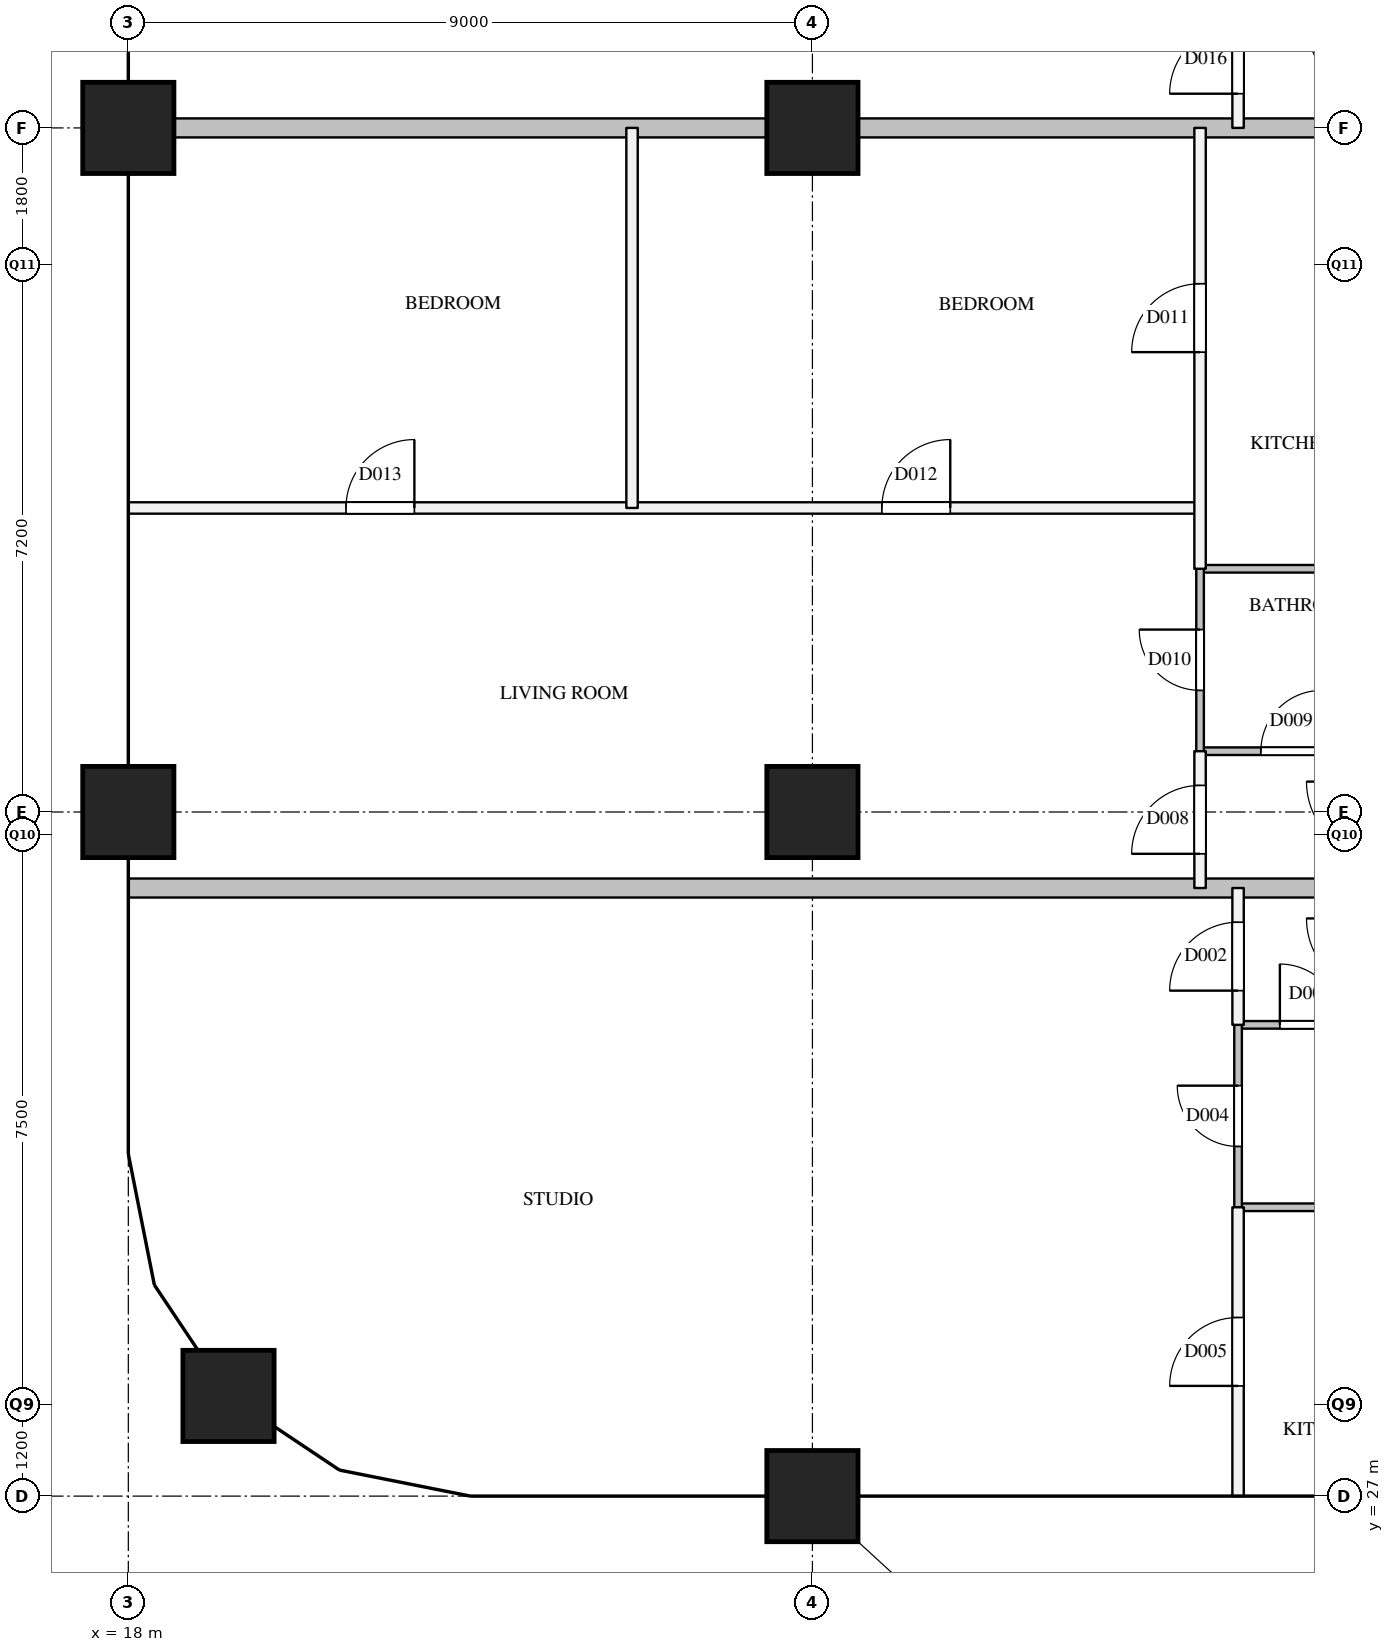
"""IFC4 building model, lengths in metres.
Left out: names, types, materials, properties, quantities, classifications, styles, units other than length and angle.
Written with IfcOpenShell. Run it as: python <this file> out.ifc"""

import sys

from ifc_helpers import new_model, si_unit, direction, frame, frame_2d, origin, origin_2d, place, context, subcontext, project, spatial, rectangle, extrude, element, fill, save


model = new_model("IFC4")
c1 = context("Model", 3, precision=1e-05, world=origin(), true_north=direction((0.0, 1.0)))
c2 = subcontext(c1, "Body", "Model", "MODEL_VIEW")
j1 = project(units=[si_unit("LENGTHUNIT", "METRE"), si_unit("PLANEANGLEUNIT", "RADIAN")], contexts=[c1])
p1 = place(None, origin())
s1 = spatial("IfcSite", under=j1, at=p1, CompositionType="ELEMENT")
p2 = place(p1, origin())
s2 = spatial("IfcBuilding", under=s1, at=p2, CompositionType="ELEMENT")
p3 = place(p2, frame((0.0, 0.0, 238.4)))
s3 = spatial("IfcBuildingStorey", under=s2, at=p3, CompositionType="ELEMENT", Elevation=238.4)
for number, where, z_axis, x_axis in (
    (1, (19.318, 28.318, 0.0), (0.0, 0.0, 1.0), (1.0, 0.0, 0.0)),
    (2, (18.0, 36.0, 0.0), (0.0, 0.0, 1.0), (1.0, 0.0, 0.0)),
    (3, (18.0, 45.0, 0.0), (0.0, 0.0, 1.0), (1.0, 0.0, 0.0)),
    (4, (27.0, 27.0, 0.0), (0.0, 0.0, 1.0), (1.0, 0.0, 0.0)),
    (5, (27.0, 36.0, 0.0), (0.0, 0.0, 1.0), (1.0, 0.0, 0.0)),
    (6, (27.0, 45.0, 0.0), (0.0, 0.0, 1.0), (1.0, 0.0, 0.0)),
):
    element("IfcColumn", number, at=place(p3, frame(where, z_axis=z_axis, x_axis=x_axis)), inside=s3, PredefinedType="COLUMN", context=c2, shape_type="SweptSolid", body=[
        extrude(rectangle(XDim=1.2, YDim=1.2, at=origin_2d()), origin(), (0.0, 0.0, 1.0), 3.9),
    ])
p4 = place(p3, frame((18.0, 40.0, 0.0), z_axis=(0.0, 0.0, 1.0), x_axis=(1.0, 0.0, 0.0)))
e7 = element("IfcWall", 7, at=p4, inside=s3, PredefinedType="PARTITIONING", context=c2, shape_type="SweptSolid", body=[
    extrude(rectangle(XDim=14.1, YDim=0.15, at=frame_2d((7.05, 0.0))), origin(), (0.0, 0.0, 1.0), 2.6),
])
p5 = place(p4, frame((9.914, 0.0, 0.0)))
e8 = element("IfcOpeningElement", 8, at=p5, cuts=e7, PredefinedType="OPENING", context=c2, shape_type="SweptSolid", body=[
    extrude(rectangle(XDim=0.9, YDim=2.1, at=frame_2d((0.45, 1.05))), frame((0.0, 0.085, 0.0), z_axis=(0.0, -1.0, 0.0), x_axis=(1.0, 0.0, 0.0)), (0.0, 0.0, 1.0), 0.17),
])
p6 = place(p4, frame((2.864, 0.0, 0.0)))
e9 = element("IfcOpeningElement", 9, at=p6, cuts=e7, PredefinedType="OPENING", context=c2, shape_type="SweptSolid", body=[
    extrude(rectangle(XDim=0.9, YDim=2.1, at=frame_2d((0.45, 1.05))), frame((0.0, 0.085, 0.0), z_axis=(0.0, -1.0, 0.0), x_axis=(1.0, 0.0, 0.0)), (0.0, 0.0, 1.0), 0.17),
])
p7 = place(p3, frame((24.627, 40.0, 0.0), z_axis=(0.0, 0.0, 1.0), x_axis=(0.0, 1.0, 0.0)))
e10 = element("IfcWall", 10, at=p7, inside=s3, PredefinedType="PARTITIONING", context=c2, shape_type="SweptSolid", body=[
    extrude(rectangle(XDim=5.0, YDim=0.15, at=frame_2d((2.5, 0.0))), origin(), (0.0, 0.0, 1.0), 3.6),
])
p8 = place(p3, frame((32.1, 35.0, 0.0), z_axis=(0.0, 0.0, 1.0), x_axis=(0.0, 1.0, 0.0)))
e11 = element("IfcWall", 11, at=p8, inside=s3, PredefinedType="PARTITIONING", context=c2, shape_type="SweptSolid", body=[
    extrude(rectangle(XDim=1.8, YDim=0.15, at=frame_2d((0.9, 0.0))), origin(), (0.0, 0.0, 1.0), 3.6),
])
p9 = place(p8, frame((0.45, 0.0, 0.0)))
e12 = element("IfcOpeningElement", 12, at=p9, cuts=e11, PredefinedType="OPENING", context=c2, shape_type="SweptSolid", body=[
    extrude(rectangle(XDim=0.9, YDim=2.1, at=frame_2d((0.45, 1.05))), frame((0.0, 0.085, 0.0), z_axis=(0.0, -1.0, 0.0), x_axis=(1.0, 0.0, 0.0)), (0.0, 0.0, 1.0), 0.17),
])
p10 = place(p3, frame((32.1, 39.2, 0.0), z_axis=(0.0, 0.0, 1.0), x_axis=(0.0, 1.0, 0.0)))
e13 = element("IfcWall", 13, at=p10, inside=s3, PredefinedType="PARTITIONING", context=c2, shape_type="SweptSolid", body=[
    extrude(rectangle(XDim=5.8, YDim=0.15, at=frame_2d((2.9, 0.0))), origin(), (0.0, 0.0, 1.0), 3.6),
])
p11 = place(p10, frame((2.85, 0.0, 0.0)))
e14 = element("IfcOpeningElement", 14, at=p11, cuts=e13, PredefinedType="OPENING", context=c2, shape_type="SweptSolid", body=[
    extrude(rectangle(XDim=0.9, YDim=2.1, at=frame_2d((0.45, 1.05))), frame((0.0, 0.085, 0.0), z_axis=(0.0, -1.0, 0.0), x_axis=(1.0, 0.0, 0.0)), (0.0, 0.0, 1.0), 0.17),
])
p12 = place(p3, frame((32.6, 27.0, 0.0), z_axis=(0.0, 0.0, 1.0), x_axis=(0.0, 1.0, 0.0)))
e15 = element("IfcWall", 15, at=p12, inside=s3, PredefinedType="PARTITIONING", context=c2, shape_type="SweptSolid", body=[
    extrude(rectangle(XDim=3.8, YDim=0.15, at=frame_2d((1.9, 0.0))), origin(), (0.0, 0.0, 1.0), 2.6),
])
p13 = place(p12, frame((1.45, 0.0, 0.0)))
e16 = element("IfcOpeningElement", 16, at=p13, cuts=e15, PredefinedType="OPENING", context=c2, shape_type="SweptSolid", body=[
    extrude(rectangle(XDim=0.9, YDim=2.1, at=frame_2d((0.45, 1.05))), frame((0.0, 0.085, 0.0), z_axis=(0.0, -1.0, 0.0), x_axis=(1.0, 0.0, 0.0)), (0.0, 0.0, 1.0), 0.17),
])
p14 = place(p3, frame((32.6, 33.2, 0.0), z_axis=(0.0, 0.0, 1.0), x_axis=(0.0, 1.0, 0.0)))
e17 = element("IfcWall", 17, at=p14, inside=s3, PredefinedType="PARTITIONING", context=c2, shape_type="SweptSolid", body=[
    extrude(rectangle(XDim=1.8, YDim=0.15, at=frame_2d((0.9, 0.0))), origin(), (0.0, 0.0, 1.0), 3.6),
])
p15 = place(p14, frame((0.45, 0.0, 0.0)))
e18 = element("IfcOpeningElement", 18, at=p15, cuts=e17, PredefinedType="OPENING", context=c2, shape_type="SweptSolid", body=[
    extrude(rectangle(XDim=0.9, YDim=2.1, at=frame_2d((0.45, 1.05))), frame((0.0, 0.085, 0.0), z_axis=(0.0, -1.0, 0.0), x_axis=(1.0, 0.0, 0.0)), (0.0, 0.0, 1.0), 0.17),
])
p16 = place(p3, frame((32.6, 45.0, 0.0), z_axis=(0.0, 0.0, 1.0), x_axis=(0.0, 1.0, 0.0)))
e19 = element("IfcWall", 19, at=p16, inside=s3, PredefinedType="PARTITIONING", context=c2, shape_type="SweptSolid", body=[
    extrude(rectangle(XDim=1.8, YDim=0.15, at=frame_2d((0.9, 0.0))), origin(), (0.0, 0.0, 1.0), 3.6),
])
p17 = place(p16, frame((0.45, 0.0, 0.0)))
e20 = element("IfcOpeningElement", 20, at=p17, cuts=e19, PredefinedType="OPENING", context=c2, shape_type="SweptSolid", body=[
    extrude(rectangle(XDim=0.9, YDim=2.1, at=frame_2d((0.45, 1.05))), frame((0.0, 0.085, 0.0), z_axis=(0.0, -1.0, 0.0), x_axis=(1.0, 0.0, 0.0)), (0.0, 0.0, 1.0), 0.17),
])
p18 = place(p3, frame((18.0, 35.0, 0.0), z_axis=(0.0, 0.0, 1.0), x_axis=(1.0, 0.0, 0.0)))
e21 = element("IfcWall", 21, at=p18, inside=s3, PredefinedType="PARTITIONING", context=c2, shape_type="SweptSolid", body=[
    extrude(rectangle(XDim=16.5, YDim=0.25, at=frame_2d((8.25, 0.0))), origin(), (0.0, 0.0, 1.0), 2.6),
])
p19 = place(p3, frame((18.0, 45.0, 0.0), z_axis=(0.0, 0.0, 1.0), x_axis=(1.0, 0.0, 0.0)))
e22 = element("IfcWall", 22, at=p19, inside=s3, PredefinedType="PARTITIONING", context=c2, shape_type="SweptSolid", body=[
    extrude(rectangle(XDim=16.5, YDim=0.25, at=frame_2d((8.25, 0.0))), origin(), (0.0, 0.0, 1.0), 3.6),
])
p20 = place(p3, frame((32.6, 30.8, 0.0), z_axis=(0.0, 0.0, 1.0), x_axis=(1.0, 0.0, 0.0)))
e23 = element("IfcWall", 23, at=p20, inside=s3, PredefinedType="PARTITIONING", context=c2, shape_type="SweptSolid", body=[
    extrude(rectangle(XDim=1.9, YDim=0.1, at=frame_2d((0.95, 0.0))), origin(), (0.0, 0.0, 1.0), 3.6),
])
p21 = place(p3, frame((32.6, 33.2, 0.0), z_axis=(0.0, 0.0, 1.0), x_axis=(1.0, 0.0, 0.0)))
e24 = element("IfcWall", 24, at=p21, inside=s3, PredefinedType="PARTITIONING", context=c2, shape_type="SweptSolid", body=[
    extrude(rectangle(XDim=1.9, YDim=0.1, at=frame_2d((0.95, 0.0))), origin(), (0.0, 0.0, 1.0), 3.6),
])
p22 = place(p21, frame((0.55, 0.0, 0.0)))
e25 = element("IfcOpeningElement", 25, at=p22, cuts=e24, PredefinedType="OPENING", context=c2, shape_type="SweptSolid", body=[
    extrude(rectangle(XDim=0.8, YDim=2.1, at=frame_2d((0.4, 1.05))), frame((0.0, 0.06, 0.0), z_axis=(0.0, -1.0, 0.0), x_axis=(1.0, 0.0, 0.0)), (0.0, 0.0, 1.0), 0.12),
])
p23 = place(p3, frame((32.1, 36.8, 0.0), z_axis=(0.0, 0.0, 1.0), x_axis=(1.0, 0.0, 0.0)))
e26 = element("IfcWall", 26, at=p23, inside=s3, PredefinedType="PARTITIONING", context=c2, shape_type="SweptSolid", body=[
    extrude(rectangle(XDim=2.4, YDim=0.1, at=frame_2d((1.2, 0.0))), origin(), (0.0, 0.0, 1.0), 3.6),
])
p24 = place(p23, frame((0.8, 0.0, 0.0)))
e27 = element("IfcOpeningElement", 27, at=p24, cuts=e26, PredefinedType="OPENING", context=c2, shape_type="SweptSolid", body=[
    extrude(rectangle(XDim=0.8, YDim=2.1, at=frame_2d((0.4, 1.05))), frame((0.0, 0.06, 0.0), z_axis=(0.0, -1.0, 0.0), x_axis=(1.0, 0.0, 0.0)), (0.0, 0.0, 1.0), 0.12),
])
p25 = place(p3, frame((32.1, 39.2, 0.0), z_axis=(0.0, 0.0, 1.0), x_axis=(1.0, 0.0, 0.0)))
e28 = element("IfcWall", 28, at=p25, inside=s3, PredefinedType="PARTITIONING", context=c2, shape_type="SweptSolid", body=[
    extrude(rectangle(XDim=2.4, YDim=0.1, at=frame_2d((1.2, 0.0))), origin(), (0.0, 0.0, 1.0), 3.6),
])
p26 = place(p3, frame((32.1, 36.8, 0.0), z_axis=(0.0, 0.0, 1.0), x_axis=(0.0, 1.0, 0.0)))
e29 = element("IfcWall", 29, at=p26, inside=s3, PredefinedType="PARTITIONING", context=c2, shape_type="SweptSolid", body=[
    extrude(rectangle(XDim=2.4, YDim=0.1, at=frame_2d((1.2, 0.0))), origin(), (0.0, 0.0, 1.0), 3.6),
])
p27 = place(p26, frame((0.8, 0.0, 0.0)))
e30 = element("IfcOpeningElement", 30, at=p27, cuts=e29, PredefinedType="OPENING", context=c2, shape_type="SweptSolid", body=[
    extrude(rectangle(XDim=0.8, YDim=2.1, at=frame_2d((0.4, 1.05))), frame((0.0, 0.06, 0.0), z_axis=(0.0, -1.0, 0.0), x_axis=(1.0, 0.0, 0.0)), (0.0, 0.0, 1.0), 0.12),
])
p28 = place(p3, frame((32.6, 30.8, 0.0), z_axis=(0.0, 0.0, 1.0), x_axis=(0.0, 1.0, 0.0)))
e31 = element("IfcWall", 31, at=p28, inside=s3, PredefinedType="PARTITIONING", context=c2, shape_type="SweptSolid", body=[
    extrude(rectangle(XDim=2.4, YDim=0.1, at=frame_2d((1.2, 0.0))), origin(), (0.0, 0.0, 1.0), 3.6),
])
p29 = place(p28, frame((0.8, 0.0, 0.0)))
e32 = element("IfcOpeningElement", 32, at=p29, cuts=e31, PredefinedType="OPENING", context=c2, shape_type="SweptSolid", body=[
    extrude(rectangle(XDim=0.8, YDim=2.1, at=frame_2d((0.4, 1.05))), frame((0.0, 0.06, 0.0), z_axis=(0.0, -1.0, 0.0), x_axis=(1.0, 0.0, 0.0)), (0.0, 0.0, 1.0), 0.12),
])
p30 = place(p15, origin())
e33 = element("IfcDoor", 33, at=p30, inside=s3, OperationType="SINGLE_SWING_LEFT", PredefinedType="DOOR", context=c2, shape_type="SweptSolid", body=[
    extrude(rectangle(XDim=0.9, YDim=2.1, at=frame_2d((0.45, 1.05))), frame((0.0, 0.025, 0.0), z_axis=(0.0, -1.0, 0.0), x_axis=(1.0, 0.0, 0.0)), (0.0, 0.0, 1.0), 0.05),
])
fill(e18, e33)
p31 = place(p22, origin())
e34 = element("IfcDoor", 34, at=p31, inside=s3, OperationType="SINGLE_SWING_LEFT", PredefinedType="DOOR", context=c2, shape_type="SweptSolid", body=[
    extrude(rectangle(XDim=0.8, YDim=2.1, at=frame_2d((0.4, 1.05))), frame((0.0, 0.025, 0.0), z_axis=(0.0, -1.0, 0.0), x_axis=(1.0, 0.0, 0.0)), (0.0, 0.0, 1.0), 0.05),
])
fill(e25, e34)
p32 = place(p29, origin())
e35 = element("IfcDoor", 35, at=p32, inside=s3, OperationType="SINGLE_SWING_RIGHT", PredefinedType="DOOR", context=c2, shape_type="SweptSolid", body=[
    extrude(rectangle(XDim=0.8, YDim=2.1, at=frame_2d((0.4, 1.05))), frame((0.0, 0.025, 0.0), z_axis=(0.0, -1.0, 0.0), x_axis=(1.0, 0.0, 0.0)), (0.0, 0.0, 1.0), 0.05),
])
fill(e32, e35)
p33 = place(p13, origin())
e36 = element("IfcDoor", 36, at=p33, inside=s3, OperationType="SINGLE_SWING_LEFT", PredefinedType="DOOR", context=c2, shape_type="SweptSolid", body=[
    extrude(rectangle(XDim=0.9, YDim=2.1, at=frame_2d((0.45, 1.05))), frame((0.0, 0.025, 0.0), z_axis=(0.0, -1.0, 0.0), x_axis=(1.0, 0.0, 0.0)), (0.0, 0.0, 1.0), 0.05),
])
fill(e16, e36)
p34 = place(p9, origin())
e37 = element("IfcDoor", 37, at=p34, inside=s3, OperationType="SINGLE_SWING_LEFT", PredefinedType="DOOR", context=c2, shape_type="SweptSolid", body=[
    extrude(rectangle(XDim=0.9, YDim=2.1, at=frame_2d((0.45, 1.05))), frame((0.0, 0.025, 0.0), z_axis=(0.0, -1.0, 0.0), x_axis=(1.0, 0.0, 0.0)), (0.0, 0.0, 1.0), 0.05),
])
fill(e12, e37)
p35 = place(p24, origin())
e38 = element("IfcDoor", 38, at=p35, inside=s3, OperationType="SINGLE_SWING_RIGHT", PredefinedType="DOOR", context=c2, shape_type="SweptSolid", body=[
    extrude(rectangle(XDim=0.8, YDim=2.1, at=frame_2d((0.4, 1.05))), frame((0.0, 0.025, 0.0), z_axis=(0.0, -1.0, 0.0), x_axis=(1.0, 0.0, 0.0)), (0.0, 0.0, 1.0), 0.05),
])
fill(e27, e38)
p36 = place(p27, origin())
e39 = element("IfcDoor", 39, at=p36, inside=s3, OperationType="SINGLE_SWING_RIGHT", PredefinedType="DOOR", context=c2, shape_type="SweptSolid", body=[
    extrude(rectangle(XDim=0.8, YDim=2.1, at=frame_2d((0.4, 1.05))), frame((0.0, 0.025, 0.0), z_axis=(0.0, -1.0, 0.0), x_axis=(1.0, 0.0, 0.0)), (0.0, 0.0, 1.0), 0.05),
])
fill(e30, e39)
p37 = place(p11, origin())
e40 = element("IfcDoor", 40, at=p37, inside=s3, OperationType="SINGLE_SWING_LEFT", PredefinedType="DOOR", context=c2, shape_type="SweptSolid", body=[
    extrude(rectangle(XDim=0.9, YDim=2.1, at=frame_2d((0.45, 1.05))), frame((0.0, 0.025, 0.0), z_axis=(0.0, -1.0, 0.0), x_axis=(1.0, 0.0, 0.0)), (0.0, 0.0, 1.0), 0.05),
])
fill(e14, e40)
p38 = place(p5, origin())
e41 = element("IfcDoor", 41, at=p38, inside=s3, OperationType="SINGLE_SWING_RIGHT", PredefinedType="DOOR", context=c2, shape_type="SweptSolid", body=[
    extrude(rectangle(XDim=0.9, YDim=2.1, at=frame_2d((0.45, 1.05))), frame((0.0, 0.025, 0.0), z_axis=(0.0, -1.0, 0.0), x_axis=(1.0, 0.0, 0.0)), (0.0, 0.0, 1.0), 0.05),
])
fill(e8, e41)
p39 = place(p6, origin())
e42 = element("IfcDoor", 42, at=p39, inside=s3, OperationType="SINGLE_SWING_RIGHT", PredefinedType="DOOR", context=c2, shape_type="SweptSolid", body=[
    extrude(rectangle(XDim=0.9, YDim=2.1, at=frame_2d((0.45, 1.05))), frame((0.0, 0.025, 0.0), z_axis=(0.0, -1.0, 0.0), x_axis=(1.0, 0.0, 0.0)), (0.0, 0.0, 1.0), 0.05),
])
fill(e9, e42)
p40 = place(p17, origin())
e43 = element("IfcDoor", 43, at=p40, inside=s3, OperationType="SINGLE_SWING_LEFT", PredefinedType="DOOR", context=c2, shape_type="SweptSolid", body=[
    extrude(rectangle(XDim=0.9, YDim=2.1, at=frame_2d((0.45, 1.05))), frame((0.0, 0.025, 0.0), z_axis=(0.0, -1.0, 0.0), x_axis=(1.0, 0.0, 0.0)), (0.0, 0.0, 1.0), 0.05),
])
fill(e20, e43)
save(model, sys.argv[1])
